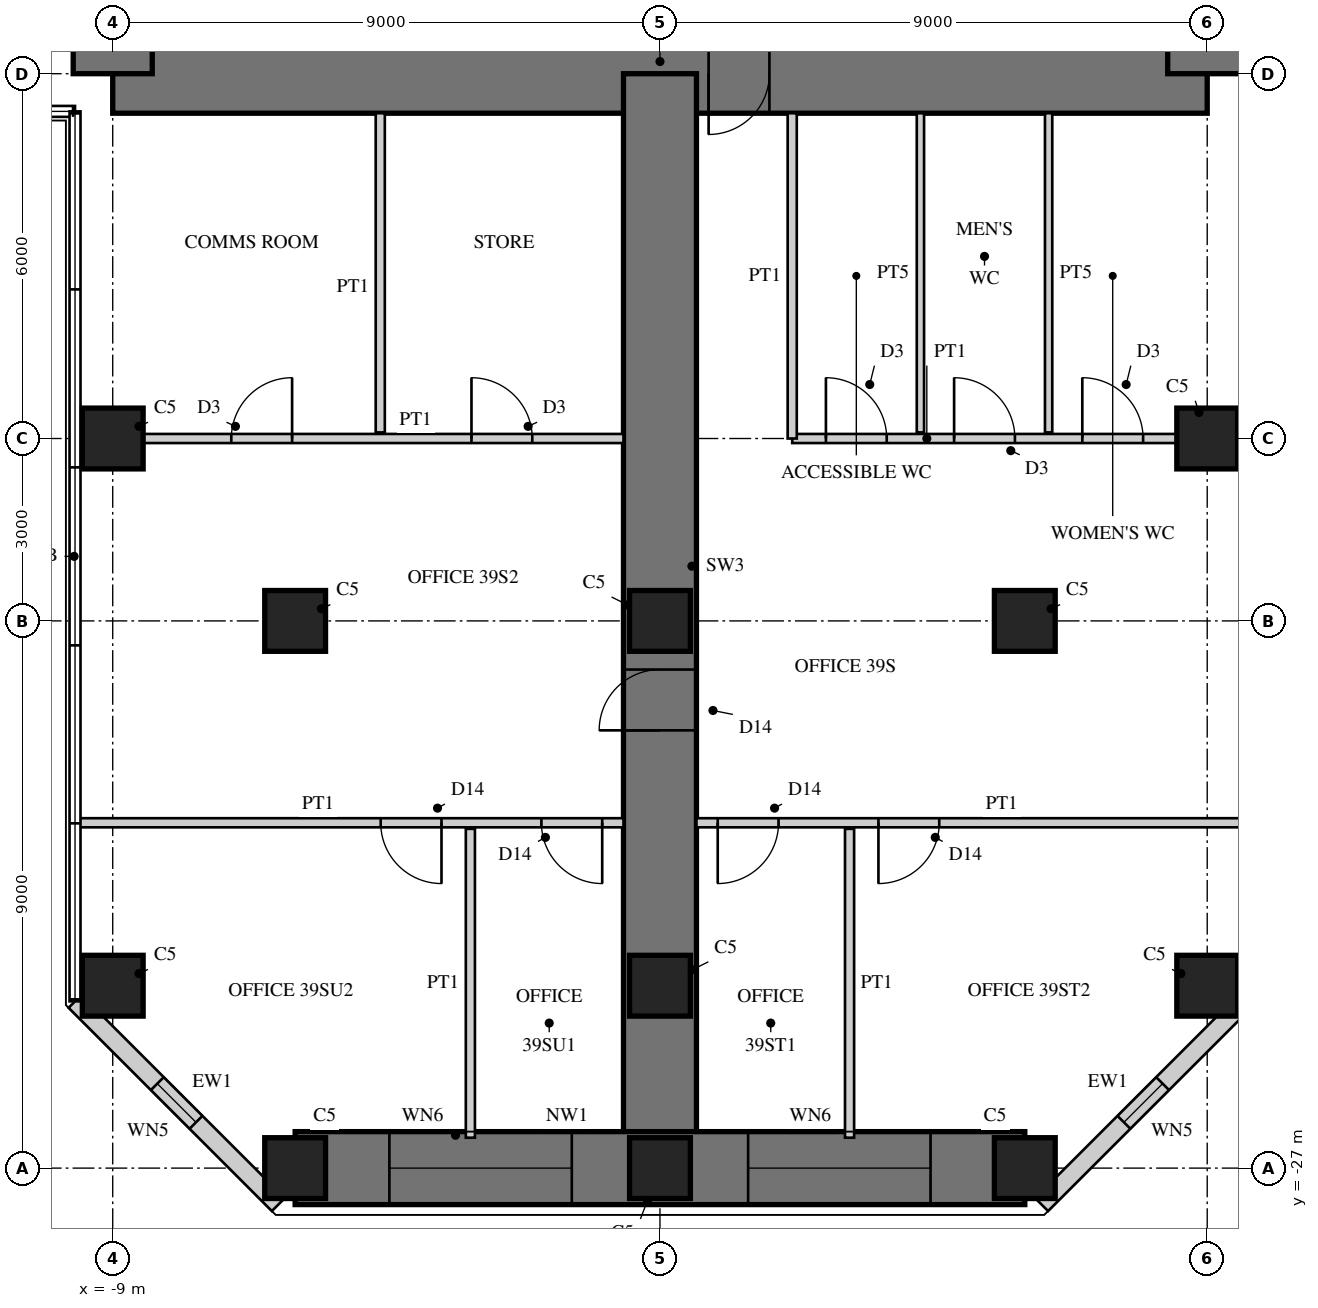
"""IFC4 building model, lengths in metres.
Left out: names, types, materials, properties, quantities, classifications, styles, units other than length and angle.
Written with IfcOpenShell. Run it as: python <this file> out.ifc"""

import sys

from ifc_helpers import new_model, si_unit, direction, frame, frame_2d, origin, origin_2d, place, context, subcontext, project, spatial, rectangle, hollow_rectangle, extrude, element, fill, save


model = new_model("IFC4")
c1 = context("Model", 3, precision=1e-05, world=origin(), true_north=direction((0.0, 1.0)))
c2 = subcontext(c1, "Body", "Model", "MODEL_VIEW")
j1 = project(units=[si_unit("LENGTHUNIT", "METRE"), si_unit("PLANEANGLEUNIT", "RADIAN")], contexts=[c1])
p1 = place(None, origin())
s1 = spatial("IfcSite", under=j1, at=p1, CompositionType="ELEMENT")
p2 = place(p1, origin())
s2 = spatial("IfcBuilding", under=s1, at=p2, CompositionType="ELEMENT")
p3 = place(p2, frame((0.0, 0.0, 160.5)))
s3 = spatial("IfcBuildingStorey", under=s2, at=p3, CompositionType="ELEMENT", Elevation=160.5)
p4 = place(p3, frame((-9.0, -9.0, 0.0), z_axis=(0.0, 0.0, 1.0), x_axis=(1.0, 0.0, 0.0)))
e1 = element("IfcWall", 1, at=p4, inside=s3, PredefinedType="SHEAR", context=c2, shape_type="SweptSolid", body=[
    extrude(rectangle(XDim=18.0, YDim=1.3, at=frame_2d((9.0, 0.0))), origin(), (0.0, 0.0, 1.0), 4.0),
])
p5 = place(p4, frame((9.8, 0.0, 0.0)))
e2 = element("IfcOpeningElement", 2, at=p5, cuts=e1, PredefinedType="OPENING", context=c2, shape_type="SweptSolid", body=[
    extrude(rectangle(XDim=1.0, YDim=2.4, at=frame_2d((0.5, 1.2))), frame((0.0, 0.66, 0.0), z_axis=(0.0, -1.0, 0.0), x_axis=(1.0, 0.0, 0.0)), (0.0, 0.0, 1.0), 1.32),
])
p6 = place(p3, frame((9.0, -9.0, 0.0), z_axis=(0.0, 0.0, 1.0), x_axis=(0.0, 1.0, 0.0)))
e3 = element("IfcWall", 3, at=p6, inside=s3, PredefinedType="SHEAR", context=c2, shape_type="SweptSolid", body=[
    extrude(rectangle(XDim=18.0, YDim=1.3, at=frame_2d((9.0, 0.0))), origin(), (0.0, 0.0, 1.0), 4.0),
])
p7 = place(p6, frame((9.8, 0.0, 0.0)))
e4 = element("IfcOpeningElement", 4, at=p7, cuts=e3, PredefinedType="OPENING", context=c2, shape_type="SweptSolid", body=[
    extrude(rectangle(XDim=1.0, YDim=2.4, at=frame_2d((0.5, 1.2))), frame((0.0, 0.66, 0.0), z_axis=(0.0, -1.0, 0.0), x_axis=(1.0, 0.0, 0.0)), (0.0, 0.0, 1.0), 1.32),
])
p8 = place(p3, frame((-9.0, 9.0, 0.0), z_axis=(0.0, 0.0, 1.0), x_axis=(0.0, -1.0, 0.0)))
e5 = element("IfcWall", 5, at=p8, inside=s3, PredefinedType="SHEAR", context=c2, shape_type="SweptSolid", body=[
    extrude(rectangle(XDim=18.0, YDim=1.3, at=frame_2d((9.0, 0.0))), origin(), (0.0, 0.0, 1.0), 4.0),
])
p9 = place(p8, frame((9.8, 0.0, 0.0)))
e6 = element("IfcOpeningElement", 6, at=p9, cuts=e5, PredefinedType="OPENING", context=c2, shape_type="SweptSolid", body=[
    extrude(rectangle(XDim=1.0, YDim=2.4, at=frame_2d((0.5, 1.2))), frame((0.0, 0.66, 0.0), z_axis=(0.0, -1.0, 0.0), x_axis=(1.0, 0.0, 0.0)), (0.0, 0.0, 1.0), 1.32),
])
p10 = place(p3, frame((0.0, -9.0, 0.0), z_axis=(0.0, 0.0, 1.0), x_axis=(0.0, -1.0, 0.0)))
e7 = element("IfcWall", 7, at=p10, inside=s3, PredefinedType="SHEAR", context=c2, shape_type="SweptSolid", body=[
    extrude(rectangle(XDim=18.0, YDim=1.2, at=frame_2d((9.0, 0.0))), origin(), (0.0, 0.0, 1.0), 4.0),
])
p11 = place(p10, frame((9.8, 0.0, 0.0)))
e8 = element("IfcOpeningElement", 8, at=p11, cuts=e7, PredefinedType="OPENING", context=c2, shape_type="SweptSolid", body=[
    extrude(rectangle(XDim=1.0, YDim=2.2, at=frame_2d((0.5, 1.1))), frame((0.0, 0.61, 0.0), z_axis=(0.0, -1.0, 0.0), x_axis=(1.0, 0.0, 0.0)), (0.0, 0.0, 1.0), 1.22),
])
p12 = place(p3, frame((-6.0, -27.0, 0.0), z_axis=(0.0, 0.0, 1.0), x_axis=(1.0, 0.0, 0.0)))
e9 = element("IfcWall", 9, at=p12, inside=s3, PredefinedType="SHEAR", context=c2, shape_type="SweptSolid", body=[
    extrude(rectangle(XDim=12.0, YDim=1.2, at=frame_2d((6.0, 0.0))), origin(), (0.0, 0.0, 1.0), 4.0),
])
p13 = place(p12, frame((1.55, 0.0, 0.6)))
e10 = element("IfcOpeningElement", 10, at=p13, cuts=e9, PredefinedType="OPENING", context=c2, shape_type="SweptSolid", body=[
    extrude(rectangle(XDim=3.0, YDim=2.4, at=frame_2d((1.5, 1.2))), frame((0.0, 0.61, 0.0), z_axis=(0.0, -1.0, 0.0), x_axis=(1.0, 0.0, 0.0)), (0.0, 0.0, 1.0), 1.22),
])
p14 = place(p12, frame((7.45, 0.0, 0.6)))
e11 = element("IfcOpeningElement", 11, at=p14, cuts=e9, PredefinedType="OPENING", context=c2, shape_type="SweptSolid", body=[
    extrude(rectangle(XDim=3.0, YDim=2.4, at=frame_2d((1.5, 1.2))), frame((0.0, 0.61, 0.0), z_axis=(0.0, -1.0, 0.0), x_axis=(1.0, 0.0, 0.0)), (0.0, 0.0, 1.0), 1.22),
])
for number, where, z_axis, x_axis in (
    (12, (-9.0, -15.0, 0.0), (0.0, 0.0, 1.0), (1.0, 0.0, 0.0)),
    (13, (-9.0, -24.0, 0.0), (0.0, 0.0, 1.0), (1.0, 0.0, 0.0)),
    (14, (9.0, -15.0, 0.0), (0.0, 0.0, 1.0), (1.0, 0.0, 0.0)),
    (15, (9.0, -24.0, 0.0), (0.0, 0.0, 1.0), (1.0, 0.0, 0.0)),
    (16, (-6.0, -27.0, 0.0), (0.0, 0.0, 1.0), (1.0, 0.0, 0.0)),
    (17, (0.0, -27.0, 0.0), (0.0, 0.0, 1.0), (1.0, 0.0, 0.0)),
    (18, (6.0, -27.0, 0.0), (0.0, 0.0, 1.0), (1.0, 0.0, 0.0)),
    (19, (-6.0, -18.0, 0.0), (0.0, 0.0, 1.0), (1.0, 0.0, 0.0)),
    (20, (0.0, -18.0, 0.0), (0.0, 0.0, 1.0), (1.0, 0.0, 0.0)),
    (21, (6.0, -18.0, 0.0), (0.0, 0.0, 1.0), (1.0, 0.0, 0.0)),
    (22, (0.0, -24.0, 0.0), (0.0, 0.0, 1.0), (1.0, 0.0, 0.0)),
):
    element("IfcColumn", number, at=place(p3, frame(where, z_axis=z_axis, x_axis=x_axis)), inside=s3, PredefinedType="COLUMN", context=c2, shape_type="SweptSolid", body=[
        extrude(rectangle(XDim=1.0, YDim=1.0, at=origin_2d()), origin(), (0.0, 0.0, 1.0), 4.0),
    ])
p15 = place(p3, frame((-9.62, -24.257, 0.0), z_axis=(0.0, 0.0, 1.0), x_axis=(0.707106781187, -0.707106781187, 0.0)))
e23 = element("IfcWall", 23, at=p15, inside=s3, PredefinedType="SOLIDWALL", context=c2, shape_type="SweptSolid", body=[
    extrude(rectangle(XDim=4.728, YDim=0.3, at=frame_2d((2.364, 0.0))), origin(), (0.0, 0.0, 1.0), 3.75),
])
p16 = place(p15, frame((1.914, 0.0, 0.3)))
e24 = element("IfcOpeningElement", 24, at=p16, cuts=e23, PredefinedType="OPENING", context=c2, shape_type="SweptSolid", body=[
    extrude(rectangle(XDim=0.9, YDim=2.4, at=frame_2d((0.45, 1.2))), frame((0.0, 0.16, 0.0), z_axis=(0.0, -1.0, 0.0), x_axis=(1.0, 0.0, 0.0)), (0.0, 0.0, 1.0), 0.32),
])
p17 = place(p3, frame((6.277, -27.6, 0.0), z_axis=(0.0, 0.0, 1.0), x_axis=(0.707106781187, 0.707106781187, 0.0)))
e25 = element("IfcWall", 25, at=p17, inside=s3, PredefinedType="SOLIDWALL", context=c2, shape_type="SweptSolid", body=[
    extrude(rectangle(XDim=4.728, YDim=0.3, at=frame_2d((2.364, 0.0))), origin(), (0.0, 0.0, 1.0), 3.75),
])
p18 = place(p17, frame((1.914, 0.0, 0.3)))
e26 = element("IfcOpeningElement", 26, at=p18, cuts=e25, PredefinedType="OPENING", context=c2, shape_type="SweptSolid", body=[
    extrude(rectangle(XDim=0.9, YDim=2.4, at=frame_2d((0.45, 1.2))), frame((0.0, 0.16, 0.0), z_axis=(0.0, -1.0, 0.0), x_axis=(1.0, 0.0, 0.0)), (0.0, 0.0, 1.0), 0.32),
])
p19 = place(p3, frame((2.175, -15.0, 0.0), z_axis=(0.0, 0.0, 1.0), x_axis=(1.0, 0.0, 0.0)))
e27 = element("IfcWall", 27, at=p19, inside=s3, PredefinedType="PARTITIONING", context=c2, shape_type="SweptSolid", body=[
    extrude(rectangle(XDim=6.325, YDim=0.15, at=frame_2d((3.163, 0.0))), origin(), (0.0, 0.0, 1.0), 2.7),
])
p20 = place(p19, frame((0.554, 0.0, 0.0)))
e28 = element("IfcOpeningElement", 28, at=p20, cuts=e27, PredefinedType="OPENING", context=c2, shape_type="SweptSolid", body=[
    extrude(rectangle(XDim=1.0, YDim=2.1, at=frame_2d((0.5, 1.05))), frame((0.0, 0.085, 0.0), z_axis=(0.0, -1.0, 0.0), x_axis=(1.0, 0.0, 0.0)), (0.0, 0.0, 1.0), 0.17),
])
p21 = place(p19, frame((2.663, 0.0, 0.0)))
e29 = element("IfcOpeningElement", 29, at=p21, cuts=e27, PredefinedType="OPENING", context=c2, shape_type="SweptSolid", body=[
    extrude(rectangle(XDim=1.0, YDim=2.1, at=frame_2d((0.5, 1.05))), frame((0.0, 0.085, 0.0), z_axis=(0.0, -1.0, 0.0), x_axis=(1.0, 0.0, 0.0)), (0.0, 0.0, 1.0), 0.17),
])
p22 = place(p19, frame((4.771, 0.0, 0.0)))
e30 = element("IfcOpeningElement", 30, at=p22, cuts=e27, PredefinedType="OPENING", context=c2, shape_type="SweptSolid", body=[
    extrude(rectangle(XDim=1.0, YDim=2.1, at=frame_2d((0.5, 1.05))), frame((0.0, 0.085, 0.0), z_axis=(0.0, -1.0, 0.0), x_axis=(1.0, 0.0, 0.0)), (0.0, 0.0, 1.0), 0.17),
])
p23 = place(p3, frame((2.175, -9.65, 0.0), z_axis=(0.0, 0.0, 1.0), x_axis=(0.0, -1.0, 0.0)))
e31 = element("IfcWall", 31, at=p23, inside=s3, PredefinedType="PARTITIONING", context=c2, shape_type="SweptSolid", body=[
    extrude(rectangle(XDim=5.35, YDim=0.15, at=frame_2d((2.675, 0.0))), origin(), (0.0, 0.0, 1.0), 3.75),
])
for number, where, z_axis, x_axis in (
    (32, (4.283, -9.65, 0.0), (0.0, 0.0, 1.0), (0.0, -1.0, 0.0)),
    (33, (6.392, -9.65, 0.0), (0.0, 0.0, 1.0), (0.0, -1.0, 0.0)),
):
    element("IfcWall", number, at=place(p3, frame(where, z_axis=z_axis, x_axis=x_axis)), inside=s3, PredefinedType="PLUMBINGWALL", context=c2, shape_type="SweptSolid", body=[
        extrude(rectangle(XDim=5.25, YDim=0.12, at=frame_2d((2.625, 0.0))), origin(), (0.0, 0.0, 1.0), 3.75),
    ])
p24 = place(p3, frame((-8.5, -15.0, 0.0), z_axis=(0.0, 0.0, 1.0), x_axis=(1.0, 0.0, 0.0)))
e34 = element("IfcWall", 34, at=p24, inside=s3, PredefinedType="PARTITIONING", context=c2, shape_type="SweptSolid", body=[
    extrude(rectangle(XDim=7.9, YDim=0.15, at=frame_2d((3.95, 0.0))), origin(), (0.0, 0.0, 1.0), 2.7),
])
p25 = place(p24, frame((1.45, 0.0, 0.0)))
e35 = element("IfcOpeningElement", 35, at=p25, cuts=e34, PredefinedType="OPENING", context=c2, shape_type="SweptSolid", body=[
    extrude(rectangle(XDim=1.0, YDim=2.1, at=frame_2d((0.5, 1.05))), frame((0.0, 0.085, 0.0), z_axis=(0.0, -1.0, 0.0), x_axis=(1.0, 0.0, 0.0)), (0.0, 0.0, 1.0), 0.17),
])
p26 = place(p24, frame((5.4, 0.0, 0.0)))
e36 = element("IfcOpeningElement", 36, at=p26, cuts=e34, PredefinedType="OPENING", context=c2, shape_type="SweptSolid", body=[
    extrude(rectangle(XDim=1.0, YDim=2.1, at=frame_2d((0.5, 1.05))), frame((0.0, 0.085, 0.0), z_axis=(0.0, -1.0, 0.0), x_axis=(1.0, 0.0, 0.0)), (0.0, 0.0, 1.0), 0.17),
])
p27 = place(p3, frame((-4.6, -9.65, 0.0), z_axis=(0.0, 0.0, 1.0), x_axis=(0.0, -1.0, 0.0)))
e37 = element("IfcWall", 37, at=p27, inside=s3, PredefinedType="PARTITIONING", context=c2, shape_type="SweptSolid", body=[
    extrude(rectangle(XDim=5.25, YDim=0.15, at=frame_2d((2.625, 0.0))), origin(), (0.0, 0.0, 1.0), 3.75),
])
p28 = place(p3, frame((3.118, -21.42, 0.0), z_axis=(0.0, 0.0, 1.0), x_axis=(0.0, -1.0, 0.0)))
e38 = element("IfcWall", 38, at=p28, inside=s3, PredefinedType="PARTITIONING", context=c2, shape_type="SweptSolid", body=[
    extrude(rectangle(XDim=5.08, YDim=0.15, at=frame_2d((2.54, 0.0))), origin(), (0.0, 0.0, 1.0), 3.75),
])
p29 = place(p3, frame((0.6, -21.32, 0.0), z_axis=(0.0, 0.0, 1.0), x_axis=(1.0, 0.0, 0.0)))
e39 = element("IfcWall", 39, at=p29, inside=s3, PredefinedType="PARTITIONING", context=c2, shape_type="SweptSolid", body=[
    extrude(rectangle(XDim=8.98, YDim=0.15, at=frame_2d((4.49, 0.0))), origin(), (0.0, 0.0, 1.0), 3.75),
])
p30 = place(p29, frame((0.35, 0.0, 0.0)))
e40 = element("IfcOpeningElement", 40, at=p30, cuts=e39, PredefinedType="OPENING", context=c2, shape_type="SweptSolid", body=[
    extrude(rectangle(XDim=1.0, YDim=2.2, at=frame_2d((0.5, 1.1))), frame((0.0, 0.085, 0.0), z_axis=(0.0, -1.0, 0.0), x_axis=(1.0, 0.0, 0.0)), (0.0, 0.0, 1.0), 0.17),
])
p31 = place(p29, frame((2.993, 0.0, 0.0)))
e41 = element("IfcOpeningElement", 41, at=p31, cuts=e39, PredefinedType="OPENING", context=c2, shape_type="SweptSolid", body=[
    extrude(rectangle(XDim=1.0, YDim=2.2, at=frame_2d((0.5, 1.1))), frame((0.0, 0.085, 0.0), z_axis=(0.0, -1.0, 0.0), x_axis=(1.0, 0.0, 0.0)), (0.0, 0.0, 1.0), 0.17),
])
p32 = place(p3, frame((-3.118, -21.42, 0.0), z_axis=(0.0, 0.0, 1.0), x_axis=(0.0, -1.0, 0.0)))
e42 = element("IfcWall", 42, at=p32, inside=s3, PredefinedType="PARTITIONING", context=c2, shape_type="SweptSolid", body=[
    extrude(rectangle(XDim=5.08, YDim=0.15, at=frame_2d((2.54, 0.0))), origin(), (0.0, 0.0, 1.0), 3.75),
])
p33 = place(p3, frame((-9.58, -21.32, 0.0), z_axis=(0.0, 0.0, 1.0), x_axis=(1.0, 0.0, 0.0)))
e43 = element("IfcWall", 43, at=p33, inside=s3, PredefinedType="PARTITIONING", context=c2, shape_type="SweptSolid", body=[
    extrude(rectangle(XDim=8.98, YDim=0.15, at=frame_2d((4.49, 0.0))), origin(), (0.0, 0.0, 1.0), 3.75),
])
p34 = place(p33, frame((4.987, 0.0, 0.0)))
e44 = element("IfcOpeningElement", 44, at=p34, cuts=e43, PredefinedType="OPENING", context=c2, shape_type="SweptSolid", body=[
    extrude(rectangle(XDim=1.0, YDim=2.2, at=frame_2d((0.5, 1.1))), frame((0.0, 0.085, 0.0), z_axis=(0.0, -1.0, 0.0), x_axis=(1.0, 0.0, 0.0)), (0.0, 0.0, 1.0), 0.17),
])
p35 = place(p33, frame((7.63, 0.0, 0.0)))
e45 = element("IfcOpeningElement", 45, at=p35, cuts=e43, PredefinedType="OPENING", context=c2, shape_type="SweptSolid", body=[
    extrude(rectangle(XDim=1.0, YDim=2.2, at=frame_2d((0.5, 1.1))), frame((0.0, 0.085, 0.0), z_axis=(0.0, -1.0, 0.0), x_axis=(1.0, 0.0, 0.0)), (0.0, 0.0, 1.0), 0.17),
])
p36 = place(p16, origin())
e46 = element("IfcWindow", 46, at=p36, inside=s3, PartitioningType="SINGLE_PANEL", PredefinedType="WINDOW", context=c2, shape_type="SweptSolid", body=[
    extrude(hollow_rectangle(XDim=0.9, YDim=2.4, WallThickness=0.06, at=frame_2d((0.45, 1.2))), frame((0.0, 0.03, 0.0), z_axis=(0.0, -1.0, 0.0), x_axis=(1.0, 0.0, 0.0)), (0.0, 0.0, 1.0), 0.06),
    extrude(rectangle(XDim=0.779, YDim=2.279, at=frame_2d((0.45, 1.2))), frame((0.0, 0.03, 0.0), z_axis=(0.0, -1.0, 0.0), x_axis=(1.0, 0.0, 0.0)), (0.0, 0.0, 1.0), 0.06),
])
fill(e24, e46)
p37 = place(p13, origin())
e47 = element("IfcWindow", 47, at=p37, inside=s3, PartitioningType="SINGLE_PANEL", PredefinedType="WINDOW", context=c2, shape_type="SweptSolid", body=[
    extrude(hollow_rectangle(XDim=3.0, YDim=2.4, WallThickness=0.06, at=frame_2d((1.5, 1.2))), frame((0.0, 0.03, 0.0), z_axis=(0.0, -1.0, 0.0), x_axis=(1.0, 0.0, 0.0)), (0.0, 0.0, 1.0), 0.06),
    extrude(rectangle(XDim=2.879, YDim=2.279, at=frame_2d((1.5, 1.2))), frame((0.0, 0.03, 0.0), z_axis=(0.0, -1.0, 0.0), x_axis=(1.0, 0.0, 0.0)), (0.0, 0.0, 1.0), 0.06),
])
fill(e10, e47)
p38 = place(p14, origin())
e48 = element("IfcWindow", 48, at=p38, inside=s3, PartitioningType="SINGLE_PANEL", PredefinedType="WINDOW", context=c2, shape_type="SweptSolid", body=[
    extrude(hollow_rectangle(XDim=3.0, YDim=2.4, WallThickness=0.06, at=frame_2d((1.5, 1.2))), frame((0.0, 0.03, 0.0), z_axis=(0.0, -1.0, 0.0), x_axis=(1.0, 0.0, 0.0)), (0.0, 0.0, 1.0), 0.06),
    extrude(rectangle(XDim=2.879, YDim=2.279, at=frame_2d((1.5, 1.2))), frame((0.0, 0.03, 0.0), z_axis=(0.0, -1.0, 0.0), x_axis=(1.0, 0.0, 0.0)), (0.0, 0.0, 1.0), 0.06),
])
fill(e11, e48)
p39 = place(p18, origin())
e49 = element("IfcWindow", 49, at=p39, inside=s3, PartitioningType="SINGLE_PANEL", PredefinedType="WINDOW", context=c2, shape_type="SweptSolid", body=[
    extrude(hollow_rectangle(XDim=0.9, YDim=2.4, WallThickness=0.06, at=frame_2d((0.45, 1.2))), frame((0.0, 0.03, 0.0), z_axis=(0.0, -1.0, 0.0), x_axis=(1.0, 0.0, 0.0)), (0.0, 0.0, 1.0), 0.06),
    extrude(rectangle(XDim=0.779, YDim=2.279, at=frame_2d((0.45, 1.2))), frame((0.0, 0.03, 0.0), z_axis=(0.0, -1.0, 0.0), x_axis=(1.0, 0.0, 0.0)), (0.0, 0.0, 1.0), 0.06),
])
fill(e26, e49)
p40 = place(p20, origin())
e50 = element("IfcDoor", 50, at=p40, inside=s3, OperationType="SINGLE_SWING_LEFT", PredefinedType="DOOR", context=c2, shape_type="SweptSolid", body=[
    extrude(rectangle(XDim=1.0, YDim=2.1, at=frame_2d((0.5, 1.05))), frame((0.0, 0.025, 0.0), z_axis=(0.0, -1.0, 0.0), x_axis=(1.0, 0.0, 0.0)), (0.0, 0.0, 1.0), 0.05),
])
fill(e28, e50)
p41 = place(p21, origin())
e51 = element("IfcDoor", 51, at=p41, inside=s3, OperationType="SINGLE_SWING_LEFT", PredefinedType="DOOR", context=c2, shape_type="SweptSolid", body=[
    extrude(rectangle(XDim=1.0, YDim=2.1, at=frame_2d((0.5, 1.05))), frame((0.0, 0.025, 0.0), z_axis=(0.0, -1.0, 0.0), x_axis=(1.0, 0.0, 0.0)), (0.0, 0.0, 1.0), 0.05),
])
fill(e29, e51)
p42 = place(p22, origin())
e52 = element("IfcDoor", 52, at=p42, inside=s3, OperationType="SINGLE_SWING_LEFT", PredefinedType="DOOR", context=c2, shape_type="SweptSolid", body=[
    extrude(rectangle(XDim=1.0, YDim=2.1, at=frame_2d((0.5, 1.05))), frame((0.0, 0.025, 0.0), z_axis=(0.0, -1.0, 0.0), x_axis=(1.0, 0.0, 0.0)), (0.0, 0.0, 1.0), 0.05),
])
fill(e30, e52)
p43 = place(p25, origin())
e53 = element("IfcDoor", 53, at=p43, inside=s3, OperationType="SINGLE_SWING_RIGHT", PredefinedType="DOOR", context=c2, shape_type="SweptSolid", body=[
    extrude(rectangle(XDim=1.0, YDim=2.1, at=frame_2d((0.5, 1.05))), frame((0.0, 0.025, 0.0), z_axis=(0.0, -1.0, 0.0), x_axis=(1.0, 0.0, 0.0)), (0.0, 0.0, 1.0), 0.05),
])
fill(e35, e53)
p44 = place(p26, origin())
e54 = element("IfcDoor", 54, at=p44, inside=s3, OperationType="SINGLE_SWING_LEFT", PredefinedType="DOOR", context=c2, shape_type="SweptSolid", body=[
    extrude(rectangle(XDim=1.0, YDim=2.1, at=frame_2d((0.5, 1.05))), frame((0.0, 0.025, 0.0), z_axis=(0.0, -1.0, 0.0), x_axis=(1.0, 0.0, 0.0)), (0.0, 0.0, 1.0), 0.05),
])
fill(e36, e54)
p45 = place(p30, frame((1.0, 0.0, 0.0), z_axis=(0.0, 0.0, 1.0), x_axis=(-1.0, 0.0, 0.0)))
e55 = element("IfcDoor", 55, at=p45, inside=s3, OperationType="SINGLE_SWING_RIGHT", PredefinedType="DOOR", context=c2, shape_type="SweptSolid", body=[
    extrude(rectangle(XDim=1.0, YDim=2.2, at=frame_2d((0.5, 1.1))), frame((0.0, 0.025, 0.0), z_axis=(0.0, -1.0, 0.0), x_axis=(1.0, 0.0, 0.0)), (0.0, 0.0, 1.0), 0.05),
])
fill(e40, e55)
p46 = place(p31, frame((1.0, 0.0, 0.0), z_axis=(0.0, 0.0, 1.0), x_axis=(-1.0, 0.0, 0.0)))
e56 = element("IfcDoor", 56, at=p46, inside=s3, OperationType="SINGLE_SWING_RIGHT", PredefinedType="DOOR", context=c2, shape_type="SweptSolid", body=[
    extrude(rectangle(XDim=1.0, YDim=2.2, at=frame_2d((0.5, 1.1))), frame((0.0, 0.025, 0.0), z_axis=(0.0, -1.0, 0.0), x_axis=(1.0, 0.0, 0.0)), (0.0, 0.0, 1.0), 0.05),
])
fill(e41, e56)
p47 = place(p34, frame((1.0, 0.0, 0.0), z_axis=(0.0, 0.0, 1.0), x_axis=(-1.0, 0.0, 0.0)))
e57 = element("IfcDoor", 57, at=p47, inside=s3, OperationType="SINGLE_SWING_LEFT", PredefinedType="DOOR", context=c2, shape_type="SweptSolid", body=[
    extrude(rectangle(XDim=1.0, YDim=2.2, at=frame_2d((0.5, 1.1))), frame((0.0, 0.025, 0.0), z_axis=(0.0, -1.0, 0.0), x_axis=(1.0, 0.0, 0.0)), (0.0, 0.0, 1.0), 0.05),
])
fill(e44, e57)
p48 = place(p35, frame((1.0, 0.0, 0.0), z_axis=(0.0, 0.0, 1.0), x_axis=(-1.0, 0.0, 0.0)))
e58 = element("IfcDoor", 58, at=p48, inside=s3, OperationType="SINGLE_SWING_LEFT", PredefinedType="DOOR", context=c2, shape_type="SweptSolid", body=[
    extrude(rectangle(XDim=1.0, YDim=2.2, at=frame_2d((0.5, 1.1))), frame((0.0, 0.025, 0.0), z_axis=(0.0, -1.0, 0.0), x_axis=(1.0, 0.0, 0.0)), (0.0, 0.0, 1.0), 0.05),
])
fill(e45, e58)
p49 = place(p11, frame((1.0, 0.0, 0.0), z_axis=(0.0, 0.0, 1.0), x_axis=(-1.0, 0.0, 0.0)))
e59 = element("IfcDoor", 59, at=p49, inside=s3, OperationType="SINGLE_SWING_LEFT", PredefinedType="DOOR", context=c2, shape_type="SweptSolid", body=[
    extrude(rectangle(XDim=1.0, YDim=2.2, at=frame_2d((0.5, 1.1))), frame((0.0, 0.025, 0.0), z_axis=(0.0, -1.0, 0.0), x_axis=(1.0, 0.0, 0.0)), (0.0, 0.0, 1.0), 0.05),
])
fill(e8, e59)
p50 = place(p5, frame((1.0, 0.0, 0.0), z_axis=(0.0, 0.0, 1.0), x_axis=(-1.0, 0.0, 0.0)))
e60 = element("IfcDoor", 60, at=p50, inside=s3, OperationType="SINGLE_SWING_RIGHT", PredefinedType="DOOR", context=c2, shape_type="SweptSolid", body=[
    extrude(rectangle(XDim=1.0, YDim=2.4, at=frame_2d((0.5, 1.2))), frame((0.0, -0.005, 0.0), z_axis=(0.0, -1.0, 0.0), x_axis=(1.0, 0.0, 0.0)), (0.0, 0.0, 1.0), 0.05),
])
fill(e2, e60)
save(model, sys.argv[1])
